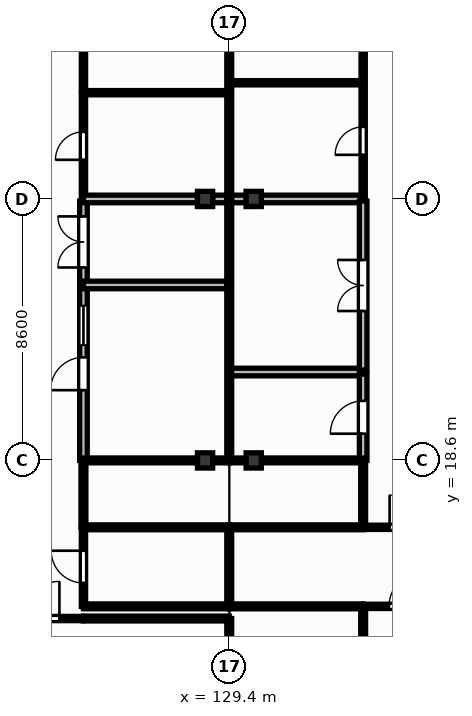
"""IFC4 building model, lengths in metres.
Left out: names, types, materials, properties, quantities, classifications, styles, units other than length and angle.
Written with IfcOpenShell. Run it as: python <this file> out.ifc"""

import sys

from ifc_helpers import new_model, si_unit, direction, frame, frame_2d, origin, origin_2d, place, context, subcontext, project, spatial, rectangle, extrude, element, fill, save


model = new_model("IFC4")
c1 = context("Model", 3, precision=1e-05, world=origin(), true_north=direction((0.0, 1.0)))
c2 = subcontext(c1, "Body", "Model", "MODEL_VIEW")
j1 = project(units=[si_unit("LENGTHUNIT", "METRE"), si_unit("PLANEANGLEUNIT", "RADIAN")], contexts=[c1])
p1 = place(None, origin())
s1 = spatial("IfcSite", under=j1, at=p1, CompositionType="ELEMENT")
p2 = place(p1, origin())
s2 = spatial("IfcBuilding", under=s1, at=p2, CompositionType="ELEMENT")
p3 = place(p2, frame((0.0, 0.0, 4.5)))
s3 = spatial("IfcBuildingStorey", under=s2, at=p3, CompositionType="ELEMENT", Elevation=4.5)
for number, where, z_axis, x_axis in (
    (1, (128.6, 18.6, 0.0), (0.0, 0.0, 1.0), (1.0, 0.0, 0.0)),
    (2, (128.6, 27.2, 0.0), (0.0, 0.0, 1.0), (1.0, 0.0, 0.0)),
    (3, (130.2, 18.6, 0.0), (0.0, 0.0, 1.0), (1.0, 0.0, 0.0)),
    (4, (130.2, 27.2, 0.0), (0.0, 0.0, 1.0), (1.0, 0.0, 0.0)),
):
    element("IfcColumn", number, at=place(p3, frame(where, z_axis=z_axis, x_axis=x_axis)), inside=s3, PredefinedType="COLUMN", context=c2, shape_type="SweptSolid", body=[
        extrude(rectangle(XDim=0.5, YDim=0.5, at=origin_2d()), origin(), (0.0, 0.0, 1.0), 4.22),
    ])
p4 = place(p3, frame((121.8, 13.4, 0.0), z_axis=(0.0, 0.0, 1.0), x_axis=(1.0, 0.0, 0.0)))
e5 = element("IfcWall", 5, at=p4, inside=s3, PredefinedType="PARTITIONING", context=c2, shape_type="SweptSolid", body=[
    extrude(rectangle(XDim=2.8, YDim=0.14, at=frame_2d((1.4, 0.0))), origin(), (0.0, 0.0, 1.0), 4.18),
])
p5 = place(p4, frame((0.79, 0.0, 0.0)))
e6 = element("IfcOpeningElement", 6, at=p5, cuts=e5, PredefinedType="OPENING", context=c2, shape_type="SweptSolid", body=[
    extrude(rectangle(XDim=1.22, YDim=2.1, at=frame_2d((0.61, 1.05))), frame((0.0, 0.08, 0.0), z_axis=(0.0, -1.0, 0.0), x_axis=(1.0, 0.0, 0.0)), (0.0, 0.0, 1.0), 0.16),
])
p6 = place(p3, frame((124.6, 13.8, 0.0), z_axis=(0.0, 0.0, 1.0), x_axis=(0.0, 1.0, 0.0)))
e7 = element("IfcWall", 7, at=p6, inside=s3, PredefinedType="PARTITIONING", context=c2, shape_type="SweptSolid", body=[
    extrude(rectangle(XDim=2.6, YDim=0.14, at=frame_2d((1.3, 0.0))), origin(), (0.0, 0.0, 1.0), 4.18),
])
p7 = place(p6, frame((0.77, 0.0, 0.0)))
e8 = element("IfcOpeningElement", 8, at=p7, cuts=e7, PredefinedType="OPENING", context=c2, shape_type="SweptSolid", body=[
    extrude(rectangle(XDim=1.06, YDim=2.15, at=frame_2d((0.53, 1.075))), frame((0.0, 0.08, 0.0), z_axis=(0.0, -1.0, 0.0), x_axis=(1.0, 0.0, 0.0)), (0.0, 0.0, 1.0), 0.16),
])
p8 = place(p3, frame((124.6, 18.6, 0.0), z_axis=(0.0, 0.0, 1.0), x_axis=(0.0, 1.0, 0.0)))
e9 = element("IfcWall", 9, at=p8, inside=s3, PredefinedType="SOLIDWALL", context=c2, shape_type="SweptSolid", body=[
    extrude(rectangle(XDim=5.701, YDim=0.25, at=frame_2d((2.851, 0.0))), origin(), (0.0, 0.0, 1.0), 4.18),
])
p9 = place(p8, frame((2.311, 0.0, 0.0)))
e10 = element("IfcOpeningElement", 10, at=p9, cuts=e9, PredefinedType="OPENING", context=c2, shape_type="SweptSolid", body=[
    extrude(rectangle(XDim=1.08, YDim=2.15, at=frame_2d((0.54, 1.075))), frame((0.0, 0.135, 0.0), z_axis=(0.0, -1.0, 0.0), x_axis=(1.0, 0.0, 0.0)), (0.0, 0.0, 1.0), 0.27),
])
p10 = place(p8, frame((3.791, 0.0, 1.1)))
e11 = element("IfcOpeningElement", 11, at=p10, cuts=e9, PredefinedType="OPENING", context=c2, shape_type="SweptSolid", body=[
    extrude(rectangle(XDim=1.3, YDim=1.0, at=frame_2d((0.65, 0.5))), frame((0.0, 0.135, 0.0), z_axis=(0.0, -1.0, 0.0), x_axis=(1.0, 0.0, 0.0)), (0.0, 0.0, 1.0), 0.27),
])
p11 = place(p3, frame((124.6, 24.441, 0.0), z_axis=(0.0, 0.0, 1.0), x_axis=(0.0, 1.0, 0.0)))
e12 = element("IfcWall", 12, at=p11, inside=s3, PredefinedType="SOLIDWALL", context=c2, shape_type="SweptSolid", body=[
    extrude(rectangle(XDim=2.689, YDim=0.25, at=frame_2d((1.344, 0.0))), origin(), (0.0, 0.0, 1.0), 4.18),
])
p12 = place(p11, frame((0.504, 0.0, 0.0)))
e13 = element("IfcOpeningElement", 13, at=p12, cuts=e12, PredefinedType="OPENING", context=c2, shape_type="SweptSolid", body=[
    extrude(rectangle(XDim=1.68, YDim=2.3, at=frame_2d((0.84, 1.15))), frame((0.0, 0.135, 0.0), z_axis=(0.0, -1.0, 0.0), x_axis=(1.0, 0.0, 0.0)), (0.0, 0.0, 1.0), 0.27),
])
p13 = place(p3, frame((124.6, 24.371, 0.0), z_axis=(0.0, 0.0, 1.0), x_axis=(1.0, 0.0, 0.0)))
e14 = element("IfcWall", 14, at=p13, inside=s3, PredefinedType="SOLIDWALL", context=c2, shape_type="SweptSolid", body=[
    extrude(rectangle(XDim=4.795, YDim=0.25, at=frame_2d((2.397, 0.0))), origin(), (0.0, 0.0, 1.0), 4.18),
])
p14 = place(p3, frame((124.6, 27.27, 0.0), z_axis=(0.0, 0.0, 1.0), x_axis=(0.0, 1.0, 0.0)))
e15 = element("IfcWall", 15, at=p14, inside=s3, PredefinedType="PARTITIONING", context=c2, shape_type="SweptSolid", body=[
    extrude(rectangle(XDim=3.354, YDim=0.14, at=frame_2d((1.677, 0.0))), origin(), (0.0, 0.0, 1.0), 4.18),
])
p15 = place(p14, frame((1.217, 0.0, 0.0)))
e16 = element("IfcOpeningElement", 16, at=p15, cuts=e15, PredefinedType="OPENING", context=c2, shape_type="SweptSolid", body=[
    extrude(rectangle(XDim=0.92, YDim=2.1, at=frame_2d((0.46, 1.05))), frame((0.0, 0.08, 0.0), z_axis=(0.0, -1.0, 0.0), x_axis=(1.0, 0.0, 0.0)), (0.0, 0.0, 1.0), 0.16),
])
p16 = place(p3, frame((124.6, 27.2, 0.0), z_axis=(0.0, 0.0, 1.0), x_axis=(1.0, 0.0, 0.0)))
e17 = element("IfcWall", 17, at=p16, inside=s3, PredefinedType="SOLIDWALL", context=c2, shape_type="SweptSolid", body=[
    extrude(rectangle(XDim=3.75, YDim=0.25, at=frame_2d((1.875, 0.0))), origin(), (0.0, 0.0, 1.0), 3.52),
])
p17 = place(p3, frame((128.85, 27.2, 0.0), z_axis=(0.0, 0.0, 1.0), x_axis=(1.0, 0.0, 0.0)))
e18 = element("IfcWall", 18, at=p17, inside=s3, PredefinedType="SOLIDWALL", context=c2, shape_type="SweptSolid", body=[
    extrude(rectangle(XDim=0.485, YDim=0.25, at=frame_2d((0.242, 0.0))), origin(), (0.0, 0.0, 1.0), 4.18),
])
p18 = place(p3, frame((124.6, 30.764, 0.0), z_axis=(0.0, 0.0, 1.0), x_axis=(0.0, 1.0, 0.0)))
e19 = element("IfcWall", 19, at=p18, inside=s3, PredefinedType="PARTITIONING", context=c2, shape_type="SweptSolid", body=[
    extrude(rectangle(XDim=5.966, YDim=0.14, at=frame_2d((2.983, 0.0))), origin(), (0.0, 0.0, 1.0), 4.18),
])
p19 = place(p18, frame((2.403, 0.0, 0.0)))
e20 = element("IfcOpeningElement", 20, at=p19, cuts=e19, PredefinedType="OPENING", context=c2, shape_type="SweptSolid", body=[
    extrude(rectangle(XDim=1.16, YDim=2.1, at=frame_2d((0.58, 1.05))), frame((0.0, 0.08, 0.0), z_axis=(0.0, -1.0, 0.0), x_axis=(1.0, 0.0, 0.0)), (0.0, 0.0, 1.0), 0.16),
])
p20 = place(p3, frame((124.6, 30.694, 0.0), z_axis=(0.0, 0.0, 1.0), x_axis=(1.0, 0.0, 0.0)))
e21 = element("IfcWall", 21, at=p20, inside=s3, PredefinedType="PARTITIONING", context=c2, shape_type="SweptSolid", body=[
    extrude(rectangle(XDim=4.795, YDim=0.14, at=frame_2d((2.397, 0.0))), origin(), (0.0, 0.0, 1.0), 4.18),
])
p21 = place(p3, frame((129.405, 21.507, 0.0), z_axis=(0.0, 0.0, 1.0), x_axis=(1.0, 0.0, 0.0)))
e22 = element("IfcWall", 22, at=p21, inside=s3, PredefinedType="SOLIDWALL", context=c2, shape_type="SweptSolid", body=[
    extrude(rectangle(XDim=4.395, YDim=0.25, at=frame_2d((2.198, 0.0))), origin(), (0.0, 0.0, 1.0), 4.18),
])
p22 = place(p3, frame((129.405, 27.2, 0.0), z_axis=(0.0, 0.0, 1.0), x_axis=(1.0, 0.0, 0.0)))
e23 = element("IfcWall", 23, at=p22, inside=s3, PredefinedType="SOLIDWALL", context=c2, shape_type="SweptSolid", body=[
    extrude(rectangle(XDim=0.545, YDim=0.25, at=frame_2d((0.272, 0.0))), origin(), (0.0, 0.0, 1.0), 4.18),
])
p23 = place(p3, frame((130.45, 27.2, 0.0), z_axis=(0.0, 0.0, 1.0), x_axis=(1.0, 0.0, 0.0)))
e24 = element("IfcWall", 24, at=p23, inside=s3, PredefinedType="SOLIDWALL", context=c2, shape_type="SweptSolid", body=[
    extrude(rectangle(XDim=3.35, YDim=0.25, at=frame_2d((1.675, 0.0))), origin(), (0.0, 0.0, 1.0), 3.52),
])
p24 = place(p3, frame((129.405, 31.021, 0.0), z_axis=(0.0, 0.0, 1.0), x_axis=(1.0, 0.0, 0.0)))
e25 = element("IfcWall", 25, at=p24, inside=s3, PredefinedType="PARTITIONING", context=c2, shape_type="SweptSolid", body=[
    extrude(rectangle(XDim=4.395, YDim=0.14, at=frame_2d((2.198, 0.0))), origin(), (0.0, 0.0, 1.0), 4.18),
])
p25 = place(p3, frame((133.8, 13.8, 0.0), z_axis=(0.0, 0.0, 1.0), x_axis=(1.0, 0.0, 0.0)))
e26 = element("IfcWall", 26, at=p25, inside=s3, PredefinedType="PARTITIONING", context=c2, shape_type="SweptSolid", body=[
    extrude(rectangle(XDim=2.8, YDim=0.14, at=frame_2d((1.4, 0.0))), origin(), (0.0, 0.0, 1.0), 4.18),
])
p26 = place(p25, frame((0.85, 0.0, 0.0)))
e27 = element("IfcOpeningElement", 27, at=p26, cuts=e26, PredefinedType="OPENING", context=c2, shape_type="SweptSolid", body=[
    extrude(rectangle(XDim=1.1, YDim=2.1, at=frame_2d((0.55, 1.05))), frame((0.0, 0.08, 0.0), z_axis=(0.0, -1.0, 0.0), x_axis=(1.0, 0.0, 0.0)), (0.0, 0.0, 1.0), 0.16),
])
p27 = place(p3, frame((133.8, 16.4, 0.0), z_axis=(0.0, 0.0, 1.0), x_axis=(1.0, 0.0, 0.0)))
e28 = element("IfcWall", 28, at=p27, inside=s3, PredefinedType="PARTITIONING", context=c2, shape_type="SweptSolid", body=[
    extrude(rectangle(XDim=2.8, YDim=0.14, at=frame_2d((1.4, 0.0))), origin(), (0.0, 0.0, 1.0), 4.18),
])
p28 = place(p27, frame((0.87, 0.0, 0.0)))
e29 = element("IfcOpeningElement", 29, at=p28, cuts=e28, PredefinedType="OPENING", context=c2, shape_type="SweptSolid", body=[
    extrude(rectangle(XDim=1.06, YDim=2.15, at=frame_2d((0.53, 1.075))), frame((0.0, 0.08, 0.0), z_axis=(0.0, -1.0, 0.0), x_axis=(1.0, 0.0, 0.0)), (0.0, 0.0, 1.0), 0.16),
])
p29 = place(p3, frame((133.8, 18.6, 0.0), z_axis=(0.0, 0.0, 1.0), x_axis=(0.0, 1.0, 0.0)))
e30 = element("IfcWall", 30, at=p29, inside=s3, PredefinedType="SOLIDWALL", context=c2, shape_type="SweptSolid", body=[
    extrude(rectangle(XDim=2.837, YDim=0.25, at=frame_2d((1.418, 0.0))), origin(), (0.0, 0.0, 1.0), 4.18),
])
p30 = place(p29, frame((0.878, 0.0, 0.0)))
e31 = element("IfcOpeningElement", 31, at=p30, cuts=e30, PredefinedType="OPENING", context=c2, shape_type="SweptSolid", body=[
    extrude(rectangle(XDim=1.08, YDim=2.15, at=frame_2d((0.54, 1.075))), frame((0.0, 0.135, 0.0), z_axis=(0.0, -1.0, 0.0), x_axis=(1.0, 0.0, 0.0)), (0.0, 0.0, 1.0), 0.27),
])
p31 = place(p3, frame((133.8, 21.577, 0.0), z_axis=(0.0, 0.0, 1.0), x_axis=(0.0, 1.0, 0.0)))
e32 = element("IfcWall", 32, at=p31, inside=s3, PredefinedType="SOLIDWALL", context=c2, shape_type="SweptSolid", body=[
    extrude(rectangle(XDim=5.553, YDim=0.25, at=frame_2d((2.776, 0.0))), origin(), (0.0, 0.0, 1.0), 4.18),
])
p32 = place(p31, frame((1.937, 0.0, 0.0)))
e33 = element("IfcOpeningElement", 33, at=p32, cuts=e32, PredefinedType="OPENING", context=c2, shape_type="SweptSolid", body=[
    extrude(rectangle(XDim=1.68, YDim=2.3, at=frame_2d((0.84, 1.15))), frame((0.0, 0.135, 0.0), z_axis=(0.0, -1.0, 0.0), x_axis=(1.0, 0.0, 0.0)), (0.0, 0.0, 1.0), 0.27),
])
p33 = place(p3, frame((133.8, 27.27, 0.0), z_axis=(0.0, 0.0, 1.0), x_axis=(0.0, 1.0, 0.0)))
e34 = element("IfcWall", 34, at=p33, inside=s3, PredefinedType="PARTITIONING", context=c2, shape_type="SweptSolid", body=[
    extrude(rectangle(XDim=3.681, YDim=0.14, at=frame_2d((1.84, 0.0))), origin(), (0.0, 0.0, 1.0), 4.18),
])
p34 = place(p33, frame((1.381, 0.0, 0.0)))
e35 = element("IfcOpeningElement", 35, at=p34, cuts=e34, PredefinedType="OPENING", context=c2, shape_type="SweptSolid", body=[
    extrude(rectangle(XDim=0.92, YDim=2.1, at=frame_2d((0.46, 1.05))), frame((0.0, 0.08, 0.0), z_axis=(0.0, -1.0, 0.0), x_axis=(1.0, 0.0, 0.0)), (0.0, 0.0, 1.0), 0.16),
])
p35 = place(p3, frame((133.8, 31.091, 0.0), z_axis=(0.0, 0.0, 1.0), x_axis=(0.0, 1.0, 0.0)))
e36 = element("IfcWall", 36, at=p35, inside=s3, PredefinedType="PARTITIONING", context=c2, shape_type="SweptSolid", body=[
    extrude(rectangle(XDim=5.639, YDim=0.14, at=frame_2d((2.819, 0.0))), origin(), (0.0, 0.0, 1.0), 4.18),
])
p36 = place(p35, frame((2.24, 0.0, 0.0)))
e37 = element("IfcOpeningElement", 37, at=p36, cuts=e36, PredefinedType="OPENING", context=c2, shape_type="SweptSolid", body=[
    extrude(rectangle(XDim=1.16, YDim=2.1, at=frame_2d((0.58, 1.05))), frame((0.0, 0.08, 0.0), z_axis=(0.0, -1.0, 0.0), x_axis=(1.0, 0.0, 0.0)), (0.0, 0.0, 1.0), 0.16),
])
p37 = place(p3, frame((129.395, 10.87, 0.0), z_axis=(0.0, 0.0, 1.0), x_axis=(0.0, 1.0, 0.0)))
e38 = element("IfcWall", 38, at=p37, inside=s3, PredefinedType="PARTITIONING", context=c2, shape_type="SweptSolid", body=[
    extrude(rectangle(XDim=2.53, YDim=0.16, at=frame_2d((1.265, 0.0))), origin(), (0.0, 0.0, 1.0), 4.18),
])
p38 = place(p3, frame((129.395, 13.4, 0.0), z_axis=(0.0, 0.0, 1.0), x_axis=(-1.0, 0.0, 0.0)))
e39 = element("IfcWall", 39, at=p38, inside=s3, PredefinedType="PARTITIONING", context=c2, shape_type="SweptSolid", body=[
    extrude(rectangle(XDim=4.795, YDim=0.16, at=frame_2d((2.397, 0.0))), origin(), (0.0, 0.0, 1.0), 4.18),
])
p39 = place(p3, frame((124.6, 16.4, 0.0), z_axis=(0.0, 0.0, 1.0), x_axis=(0.0, 1.0, 0.0)))
e40 = element("IfcWall", 40, at=p39, inside=s3, PredefinedType="PARTITIONING", context=c2, shape_type="SweptSolid", body=[
    extrude(rectangle(XDim=2.2, YDim=0.16, at=frame_2d((1.1, 0.0))), origin(), (0.0, 0.0, 1.0), 4.18),
])
p40 = place(p3, frame((124.6, 13.8, 0.0), z_axis=(0.0, 0.0, 1.0), x_axis=(1.0, 0.0, 0.0)))
e41 = element("IfcWall", 41, at=p40, inside=s3, PredefinedType="PARTITIONING", context=c2, shape_type="SweptSolid", body=[
    extrude(rectangle(XDim=4.795, YDim=0.16, at=frame_2d((2.397, 0.0))), origin(), (0.0, 0.0, 1.0), 4.18),
])
p41 = place(p3, frame((129.395, 13.8, 0.0), z_axis=(0.0, 0.0, 1.0), x_axis=(0.0, 1.0, 0.0)))
e42 = element("IfcWall", 42, at=p41, inside=s3, PredefinedType="PARTITIONING", context=c2, shape_type="SweptSolid", body=[
    extrude(rectangle(XDim=2.6, YDim=0.16, at=frame_2d((1.3, 0.0))), origin(), (0.0, 0.0, 1.0), 4.18),
])
p42 = place(p3, frame((129.395, 16.4, 0.0), z_axis=(0.0, 0.0, 1.0), x_axis=(-1.0, 0.0, 0.0)))
e43 = element("IfcWall", 43, at=p42, inside=s3, PredefinedType="PARTITIONING", context=c2, shape_type="SweptSolid", body=[
    extrude(rectangle(XDim=4.795, YDim=0.16, at=frame_2d((2.397, 0.0))), origin(), (0.0, 0.0, 1.0), 4.18),
])
for number, where, z_axis, x_axis in (
    (44, (129.405, 13.8, 0.0), (0.0, 0.0, 1.0), (1.0, 0.0, 0.0)),
    (45, (133.8, 16.4, 0.0), (0.0, 0.0, 1.0), (-1.0, 0.0, 0.0)),
):
    element("IfcWall", number, at=place(p3, frame(where, z_axis=z_axis, x_axis=x_axis)), inside=s3, PredefinedType="PARTITIONING", context=c2, shape_type="SweptSolid", body=[
        extrude(rectangle(XDim=4.395, YDim=0.16, at=frame_2d((2.198, 0.0))), origin(), (0.0, 0.0, 1.0), 4.18),
    ])
p43 = place(p3, frame((133.8, 9.8, 0.0), z_axis=(0.0, 0.0, 1.0), x_axis=(0.0, 1.0, 0.0)))
e46 = element("IfcWall", 46, at=p43, inside=s3, PredefinedType="PARTITIONING", context=c2, shape_type="SweptSolid", body=[
    extrude(rectangle(XDim=3.93, YDim=0.16, at=frame_2d((1.965, 0.0))), origin(), (0.0, 0.0, 1.0), 4.18),
])
p44 = place(p3, frame((133.8, 16.47, 0.0), z_axis=(0.0, 0.0, 1.0), x_axis=(0.0, 1.0, 0.0)))
e47 = element("IfcWall", 47, at=p44, inside=s3, PredefinedType="PARTITIONING", context=c2, shape_type="SweptSolid", body=[
    extrude(rectangle(XDim=2.13, YDim=0.16, at=frame_2d((1.065, 0.0))), origin(), (0.0, 0.0, 1.0), 4.18),
])
p45 = place(p3, frame((124.6, 18.6, 0.0), z_axis=(0.0, 0.0, 1.0), x_axis=(1.0, 0.0, 0.0)))
e48 = element("IfcWall", 48, at=p45, inside=s3, PredefinedType="PARTITIONING", context=c2, shape_type="SweptSolid", body=[
    extrude(rectangle(XDim=3.75, YDim=0.16, at=frame_2d((1.875, 0.0))), origin(), (0.0, 0.0, 1.0), 3.52),
])
p46 = place(p3, frame((128.85, 18.6, 0.0), z_axis=(0.0, 0.0, 1.0), x_axis=(1.0, 0.0, 0.0)))
e49 = element("IfcWall", 49, at=p46, inside=s3, PredefinedType="PARTITIONING", context=c2, shape_type="SweptSolid", body=[
    extrude(rectangle(XDim=0.545, YDim=0.16, at=frame_2d((0.272, 0.0))), origin(), (0.0, 0.0, 1.0), 4.18),
])
p47 = place(p3, frame((129.395, 18.6, 0.0), z_axis=(0.0, 0.0, 1.0), x_axis=(0.0, 1.0, 0.0)))
e50 = element("IfcWall", 50, at=p47, inside=s3, PredefinedType="PARTITIONING", context=c2, shape_type="SweptSolid", body=[
    extrude(rectangle(XDim=5.7, YDim=0.16, at=frame_2d((2.85, 0.0))), origin(), (0.0, 0.0, 1.0), 4.18),
])
p48 = place(p3, frame((129.395, 24.441, 0.0), z_axis=(0.0, 0.0, 1.0), x_axis=(0.0, 1.0, 0.0)))
e51 = element("IfcWall", 51, at=p48, inside=s3, PredefinedType="PARTITIONING", context=c2, shape_type="SweptSolid", body=[
    extrude(rectangle(XDim=2.689, YDim=0.16, at=frame_2d((1.345, 0.0))), origin(), (0.0, 0.0, 1.0), 4.18),
])
p49 = place(p3, frame((129.395, 27.27, 0.0), z_axis=(0.0, 0.0, 1.0), x_axis=(0.0, 1.0, 0.0)))
e52 = element("IfcWall", 52, at=p49, inside=s3, PredefinedType="PARTITIONING", context=c2, shape_type="SweptSolid", body=[
    extrude(rectangle(XDim=3.354, YDim=0.16, at=frame_2d((1.677, 0.0))), origin(), (0.0, 0.0, 1.0), 4.18),
])
p50 = place(p3, frame((129.395, 30.764, 0.0), z_axis=(0.0, 0.0, 1.0), x_axis=(0.0, 1.0, 0.0)))
e53 = element("IfcWall", 53, at=p50, inside=s3, PredefinedType="PARTITIONING", context=c2, shape_type="SweptSolid", body=[
    extrude(rectangle(XDim=5.966, YDim=0.16, at=frame_2d((2.983, 0.0))), origin(), (0.0, 0.0, 1.0), 4.18),
])
p51 = place(p3, frame((129.405, 18.6, 0.0), z_axis=(0.0, 0.0, 1.0), x_axis=(1.0, 0.0, 0.0)))
e54 = element("IfcWall", 54, at=p51, inside=s3, PredefinedType="PARTITIONING", context=c2, shape_type="SweptSolid", body=[
    extrude(rectangle(XDim=0.545, YDim=0.16, at=frame_2d((0.272, 0.0))), origin(), (0.0, 0.0, 1.0), 4.18),
])
p52 = place(p3, frame((130.45, 18.6, 0.0), z_axis=(0.0, 0.0, 1.0), x_axis=(1.0, 0.0, 0.0)))
e55 = element("IfcWall", 55, at=p52, inside=s3, PredefinedType="PARTITIONING", context=c2, shape_type="SweptSolid", body=[
    extrude(rectangle(XDim=3.35, YDim=0.16, at=frame_2d((1.675, 0.0))), origin(), (0.0, 0.0, 1.0), 3.52),
])
p53 = place(p5, origin())
e56 = element("IfcDoor", 56, at=p53, inside=s3, OperationType="SINGLE_SWING_RIGHT", PredefinedType="DOOR", context=c2, shape_type="SweptSolid", body=[
    extrude(rectangle(XDim=1.22, YDim=2.1, at=frame_2d((0.61, 1.05))), frame((0.0, 0.025, 0.0), z_axis=(0.0, -1.0, 0.0), x_axis=(1.0, 0.0, 0.0)), (0.0, 0.0, 1.0), 0.05),
])
fill(e6, e56)
p54 = place(p7, origin())
e57 = element("IfcDoor", 57, at=p54, inside=s3, OperationType="SINGLE_SWING_RIGHT", PredefinedType="DOOR", context=c2, shape_type="SweptSolid", body=[
    extrude(rectangle(XDim=1.06, YDim=2.15, at=frame_2d((0.53, 1.075))), frame((0.0, 0.025, 0.0), z_axis=(0.0, -1.0, 0.0), x_axis=(1.0, 0.0, 0.0)), (0.0, 0.0, 1.0), 0.05),
])
fill(e8, e57)
p55 = place(p26, origin())
e58 = element("IfcDoor", 58, at=p55, inside=s3, OperationType="SINGLE_SWING_RIGHT", PredefinedType="DOOR", context=c2, shape_type="SweptSolid", body=[
    extrude(rectangle(XDim=1.1, YDim=2.1, at=frame_2d((0.55, 1.05))), frame((0.0, 0.025, 0.0), z_axis=(0.0, -1.0, 0.0), x_axis=(1.0, 0.0, 0.0)), (0.0, 0.0, 1.0), 0.05),
])
fill(e27, e58)
p56 = place(p28, origin())
e59 = element("IfcDoor", 59, at=p56, inside=s3, OperationType="SINGLE_SWING_LEFT", PredefinedType="DOOR", context=c2, shape_type="SweptSolid", body=[
    extrude(rectangle(XDim=1.06, YDim=2.15, at=frame_2d((0.53, 1.075))), frame((0.0, 0.025, 0.0), z_axis=(0.0, -1.0, 0.0), x_axis=(1.0, 0.0, 0.0)), (0.0, 0.0, 1.0), 0.05),
])
fill(e29, e59)
p57 = place(p9, origin())
e60 = element("IfcDoor", 60, at=p57, inside=s3, OperationType="SINGLE_SWING_LEFT", PredefinedType="DOOR", context=c2, shape_type="SweptSolid", body=[
    extrude(rectangle(XDim=1.08, YDim=2.15, at=frame_2d((0.54, 1.075))), frame((0.0, 0.025, 0.0), z_axis=(0.0, -1.0, 0.0), x_axis=(1.0, 0.0, 0.0)), (0.0, 0.0, 1.0), 0.05),
])
fill(e10, e60)
p58 = place(p10, origin())
e61 = element("IfcWindow", 61, at=p58, inside=s3, PartitioningType="SINGLE_PANEL", PredefinedType="WINDOW", context=c2, shape_type="SweptSolid", body=[
    extrude(rectangle(XDim=1.3, YDim=1.0, at=frame_2d((0.65, 0.5))), frame((0.0, 0.03, 0.0), z_axis=(0.0, -1.0, 0.0), x_axis=(1.0, 0.0, 0.0)), (0.0, 0.0, 1.0), 0.06),
])
fill(e11, e61)
p59 = place(p12, origin())
e62 = element("IfcDoor", 62, at=p59, inside=s3, OperationType="DOUBLE_DOOR_SINGLE_SWING", PredefinedType="DOOR", context=c2, shape_type="SweptSolid", body=[
    extrude(rectangle(XDim=1.68, YDim=2.3, at=frame_2d((0.84, 1.15))), frame((0.0, 0.025, 0.0), z_axis=(0.0, -1.0, 0.0), x_axis=(1.0, 0.0, 0.0)), (0.0, 0.0, 1.0), 0.05),
])
fill(e13, e62)
p60 = place(p15, origin())
e63 = element("IfcDoor", 63, at=p60, inside=s3, OperationType="SINGLE_SWING_LEFT", PredefinedType="DOOR", context=c2, shape_type="SweptSolid", body=[
    extrude(rectangle(XDim=0.92, YDim=2.1, at=frame_2d((0.46, 1.05))), frame((0.0, 0.025, 0.0), z_axis=(0.0, -1.0, 0.0), x_axis=(1.0, 0.0, 0.0)), (0.0, 0.0, 1.0), 0.05),
])
fill(e16, e63)
p61 = place(p30, origin())
e64 = element("IfcDoor", 64, at=p61, inside=s3, OperationType="SINGLE_SWING_LEFT", PredefinedType="DOOR", context=c2, shape_type="SweptSolid", body=[
    extrude(rectangle(XDim=1.08, YDim=2.15, at=frame_2d((0.54, 1.075))), frame((0.0, 0.025, 0.0), z_axis=(0.0, -1.0, 0.0), x_axis=(1.0, 0.0, 0.0)), (0.0, 0.0, 1.0), 0.05),
])
fill(e31, e64)
p62 = place(p32, origin())
e65 = element("IfcDoor", 65, at=p62, inside=s3, OperationType="DOUBLE_DOOR_SINGLE_SWING", PredefinedType="DOOR", context=c2, shape_type="SweptSolid", body=[
    extrude(rectangle(XDim=1.68, YDim=2.3, at=frame_2d((0.84, 1.15))), frame((0.0, 0.025, 0.0), z_axis=(0.0, -1.0, 0.0), x_axis=(1.0, 0.0, 0.0)), (0.0, 0.0, 1.0), 0.05),
])
fill(e33, e65)
p63 = place(p34, origin())
e66 = element("IfcDoor", 66, at=p63, inside=s3, OperationType="SINGLE_SWING_LEFT", PredefinedType="DOOR", context=c2, shape_type="SweptSolid", body=[
    extrude(rectangle(XDim=0.92, YDim=2.1, at=frame_2d((0.46, 1.05))), frame((0.0, 0.025, 0.0), z_axis=(0.0, -1.0, 0.0), x_axis=(1.0, 0.0, 0.0)), (0.0, 0.0, 1.0), 0.05),
])
fill(e35, e66)
save(model, sys.argv[1])
